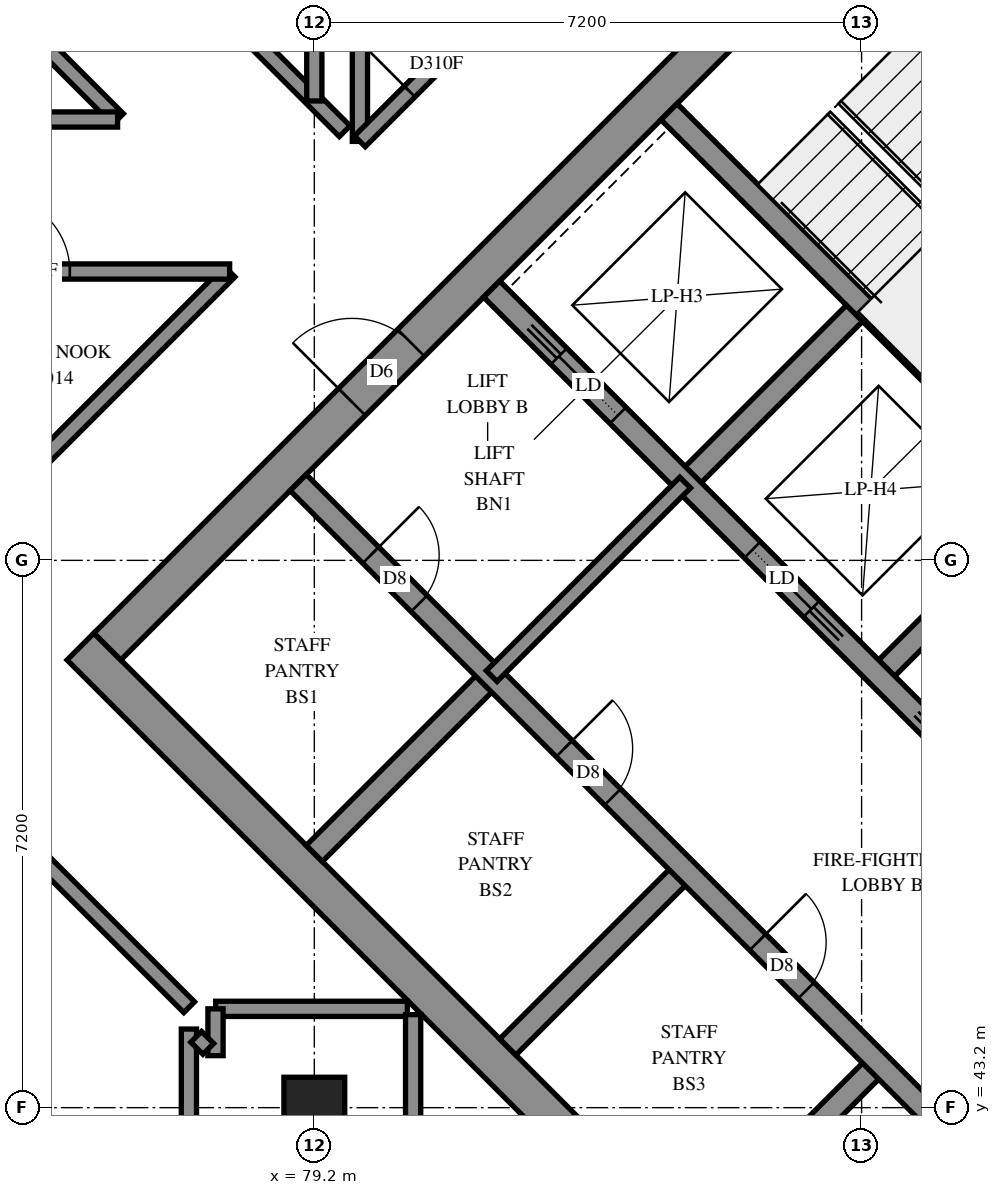
"""IFC4 building model, lengths in metres.
Left out: names, types, materials, properties, quantities, classifications, styles, units other than length and angle.
Written with IfcOpenShell. Run it as: python <this file> out.ifc"""

import sys

from ifc_helpers import new_model, si_unit, direction, frame, frame_2d, origin, origin_2d, place, context, subcontext, project, spatial, rectangle, extrude, element, fill, save


model = new_model("IFC4")
c1 = context("Model", 3, precision=1e-05, world=origin(), true_north=direction((0.0, 1.0)))
c2 = subcontext(c1, "Body", "Model", "MODEL_VIEW")
j1 = project(units=[si_unit("LENGTHUNIT", "METRE"), si_unit("PLANEANGLEUNIT", "RADIAN")], contexts=[c1])
p1 = place(None, origin())
s1 = spatial("IfcSite", under=j1, at=p1, CompositionType="ELEMENT")
p2 = place(p1, origin())
s2 = spatial("IfcBuilding", under=s1, at=p2, CompositionType="ELEMENT")
p3 = place(p2, frame((0.0, 0.0, 216.8)))
s3 = spatial("IfcBuildingStorey", under=s2, at=p3, CompositionType="ELEMENT", Elevation=216.8)
p4 = place(p3, frame((79.2, 43.2, 0.0), z_axis=(0.0, 0.0, 1.0), x_axis=(1.0, 0.0, 0.0)))
e1 = element("IfcColumn", 1, at=p4, inside=s3, PredefinedType="COLUMN", context=c2, shape_type="SweptSolid", body=[
    extrude(rectangle(XDim=0.8, YDim=0.8, at=origin_2d()), origin(), (0.0, 0.0, 1.0), 3.1),
])
p5 = place(p3, frame((76.124, 49.267, -0.3), z_axis=(0.0, 0.0, 1.0), x_axis=(0.7071067812, -0.7071067812, 0.0)))
e2 = element("IfcWall", 2, at=p5, inside=s3, PredefinedType="SHEAR", context=c2, shape_type="SweptSolid", body=[
    extrude(rectangle(XDim=15.4, YDim=0.5, at=frame_2d((7.7, 0.0))), origin(), (0.0, 0.0, 1.0), 2.7),
])
p6 = place(p3, frame((86.66, 59.802, -0.3), z_axis=(0.0, 0.0, 1.0), x_axis=(0.7071067812, -0.7071067812, 0.0)))
e3 = element("IfcWall", 3, at=p6, inside=s3, PredefinedType="SHEAR", context=c2, shape_type="SweptSolid", body=[
    extrude(rectangle(XDim=15.4, YDim=0.5, at=frame_2d((7.7, 0.0))), origin(), (0.0, 0.0, 1.0), 2.7),
])
p7 = place(p6, frame((10.5, 0.0, 0.3)))
e4 = element("IfcOpeningElement", 4, at=p7, cuts=e3, PredefinedType="OPENING", context=c2, shape_type="SweptSolid", body=[
    extrude(rectangle(XDim=0.8, YDim=2.1, at=frame_2d((0.4, 1.05))), frame((0.0, 0.26, 0.0), z_axis=(0.0, -1.0, 0.0), x_axis=(1.0, 0.0, 0.0)), (0.0, 0.0, 1.0), 0.52),
])
p8 = place(p3, frame((76.478, 49.267, -0.3), z_axis=(0.0, 0.0, 1.0), x_axis=(0.7071067812, 0.7071067812, 0.0)))
e5 = element("IfcWall", 5, at=p8, inside=s3, PredefinedType="SHEAR", context=c2, shape_type="SweptSolid", body=[
    extrude(rectangle(XDim=14.4, YDim=0.5, at=frame_2d((7.2, 0.0))), origin(), (0.0, 0.0, 1.0), 2.7),
])
p9 = place(p8, frame((4.55, 0.0, 0.3)))
e6 = element("IfcOpeningElement", 6, at=p9, cuts=e5, PredefinedType="OPENING", context=c2, shape_type="SweptSolid", body=[
    extrude(rectangle(XDim=1.1, YDim=2.1, at=frame_2d((0.55, 1.05))), frame((0.0, 0.26, 0.0), z_axis=(0.0, -1.0, 0.0), x_axis=(1.0, 0.0, 0.0)), (0.0, 0.0, 1.0), 0.52),
])
p10 = place(p8, frame((11.35, 0.0, 0.3)))
e7 = element("IfcOpeningElement", 7, at=p10, cuts=e5, PredefinedType="OPENING", context=c2, shape_type="SweptSolid", body=[
    extrude(rectangle(XDim=1.1, YDim=2.1, at=frame_2d((0.55, 1.05))), frame((0.0, 0.26, 0.0), z_axis=(0.0, -1.0, 0.0), x_axis=(1.0, 0.0, 0.0)), (0.0, 0.0, 1.0), 0.52),
])
p11 = place(p3, frame((87.013, 38.731, -0.3), z_axis=(0.0, 0.0, 1.0), x_axis=(0.7071067812, 0.7071067812, 0.0)))
e8 = element("IfcWall", 8, at=p11, inside=s3, PredefinedType="SHEAR", context=c2, shape_type="SweptSolid", body=[
    extrude(rectangle(XDim=14.4, YDim=0.5, at=frame_2d((7.2, 0.0))), origin(), (0.0, 0.0, 1.0), 2.7),
])
p12 = place(p11, frame((4.55, 0.0, 0.3)))
e9 = element("IfcOpeningElement", 9, at=p12, cuts=e8, PredefinedType="OPENING", context=c2, shape_type="SweptSolid", body=[
    extrude(rectangle(XDim=1.1, YDim=2.1, at=frame_2d((0.55, 1.05))), frame((0.0, 0.26, 0.0), z_axis=(0.0, -1.0, 0.0), x_axis=(1.0, 0.0, 0.0)), (0.0, 0.0, 1.0), 0.52),
])
p13 = place(p11, frame((11.35, 0.0, 0.3)))
e10 = element("IfcOpeningElement", 10, at=p13, cuts=e8, PredefinedType="OPENING", context=c2, shape_type="SweptSolid", body=[
    extrude(rectangle(XDim=1.1, YDim=2.1, at=frame_2d((0.55, 1.05))), frame((0.0, 0.26, 0.0), z_axis=(0.0, -1.0, 0.0), x_axis=(1.0, 0.0, 0.0)), (0.0, 0.0, 1.0), 0.52),
])
for number, where, z_axis, x_axis in (
    (11, (79.2, 46.544, 0.0), (0.0, 0.0, 1.0), (0.707, 0.707, 0.0)),
    (12, (84.079, 51.423, 0.0), (0.0, 0.0, 1.0), (0.707, 0.707, 0.0)),
):
    element("IfcWall", number, at=place(p3, frame(where, z_axis=z_axis, x_axis=x_axis)), inside=s3, PredefinedType="SOLIDWALL", context=c2, shape_type="SweptSolid", body=[
        extrude(rectangle(XDim=3.3, YDim=0.3, at=frame_2d((1.65, 0.0))), origin(), (0.0, 0.0, 1.0), 3.1),
    ])
p14 = place(p3, frame((81.746, 43.999, 0.0), z_axis=(0.0, 0.0, 1.0), x_axis=(0.7071067812, 0.7071067812, 0.0)))
e13 = element("IfcWall", 13, at=p14, inside=s3, PredefinedType="SOLIDWALL", context=c2, shape_type="SweptSolid", body=[
    extrude(rectangle(XDim=3.3, YDim=0.3, at=frame_2d((1.65, 0.0))), origin(), (0.0, 0.0, 1.0), 3.1),
])
p15 = place(p3, frame((86.625, 48.878, 0.0), z_axis=(0.0, 0.0, 1.0), x_axis=(0.7071067812, 0.7071067812, 0.0)))
e14 = element("IfcWall", 14, at=p15, inside=s3, PredefinedType="SOLIDWALL", context=c2, shape_type="SweptSolid", body=[
    extrude(rectangle(XDim=3.3, YDim=0.3, at=frame_2d((1.65, 0.0))), origin(), (0.0, 0.0, 1.0), 3.1),
])
p16 = place(p3, frame((84.291, 41.453, 0.0), z_axis=(0.0, 0.0, 1.0), x_axis=(0.7071067812, 0.7071067812, 0.0)))
e15 = element("IfcWall", 15, at=p16, inside=s3, PredefinedType="SOLIDWALL", context=c2, shape_type="SweptSolid", body=[
    extrude(rectangle(XDim=3.3, YDim=0.3, at=frame_2d((1.65, 0.0))), origin(), (0.0, 0.0, 1.0), 3.1),
])
p17 = place(p3, frame((78.988, 51.423, 0.0), z_axis=(0.0, 0.0, 1.0), x_axis=(0.7071067812, -0.7071067812, 0.0)))
e16 = element("IfcWall", 16, at=p17, inside=s3, PredefinedType="SOLIDWALL", context=c2, shape_type="SweptSolid", body=[
    extrude(rectangle(XDim=14.4, YDim=0.3, at=frame_2d((7.2, 0.0))), origin(), (0.0, 0.0, 1.0), 3.1),
])
p18 = place(p17, frame((1.35, 0.0, 0.0)))
e17 = element("IfcOpeningElement", 17, at=p18, cuts=e16, PredefinedType="OPENING", context=c2, shape_type="SweptSolid", body=[
    extrude(rectangle(XDim=0.9, YDim=2.1, at=frame_2d((0.45, 1.05))), frame((0.0, 0.16, 0.0), z_axis=(0.0, -1.0, 0.0), x_axis=(1.0, 0.0, 0.0)), (0.0, 0.0, 1.0), 0.32),
])
p19 = place(p17, frame((4.95, 0.0, 0.0)))
e18 = element("IfcOpeningElement", 18, at=p19, cuts=e16, PredefinedType="OPENING", context=c2, shape_type="SweptSolid", body=[
    extrude(rectangle(XDim=0.9, YDim=2.1, at=frame_2d((0.45, 1.05))), frame((0.0, 0.16, 0.0), z_axis=(0.0, -1.0, 0.0), x_axis=(1.0, 0.0, 0.0)), (0.0, 0.0, 1.0), 0.32),
])
p20 = place(p17, frame((8.55, 0.0, 0.0)))
e19 = element("IfcOpeningElement", 19, at=p20, cuts=e16, PredefinedType="OPENING", context=c2, shape_type="SweptSolid", body=[
    extrude(rectangle(XDim=0.9, YDim=2.1, at=frame_2d((0.45, 1.05))), frame((0.0, 0.16, 0.0), z_axis=(0.0, -1.0, 0.0), x_axis=(1.0, 0.0, 0.0)), (0.0, 0.0, 1.0), 0.32),
])
p21 = place(p17, frame((12.05, 0.0, 0.0)))
e20 = element("IfcOpeningElement", 20, at=p21, cuts=e16, PredefinedType="OPENING", context=c2, shape_type="SweptSolid", body=[
    extrude(rectangle(XDim=1.1, YDim=2.1, at=frame_2d((0.55, 1.05))), frame((0.0, 0.16, 0.0), z_axis=(0.0, -1.0, 0.0), x_axis=(1.0, 0.0, 0.0)), (0.0, 0.0, 1.0), 0.32),
])
p22 = place(p3, frame((81.534, 53.969, 0.0), z_axis=(0.0, 0.0, 1.0), x_axis=(0.707103309, -0.7071102534, 0.0)))
e21 = element("IfcWall", 21, at=p22, inside=s3, PredefinedType="SOLIDWALL", context=c2, shape_type="SweptSolid", body=[
    extrude(rectangle(XDim=14.4, YDim=0.3, at=frame_2d((7.2, 0.0))), origin(), (0.0, 0.0, 1.0), 3.1),
])
p23 = place(p22, frame((1.25, 0.0, 0.0)))
e22 = element("IfcOpeningElement", 22, at=p23, cuts=e21, PredefinedType="OPENING", context=c2, shape_type="SweptSolid", body=[
    extrude(rectangle(XDim=1.1, YDim=2.1, at=frame_2d((0.55, 1.05))), frame((0.0, 0.16, 0.0), z_axis=(0.0, -1.0, 0.0), x_axis=(1.0, 0.0, 0.0)), (0.0, 0.0, 1.0), 0.32),
])
p24 = place(p22, frame((4.85, 0.0, 0.0)))
e23 = element("IfcOpeningElement", 23, at=p24, cuts=e21, PredefinedType="OPENING", context=c2, shape_type="SweptSolid", body=[
    extrude(rectangle(XDim=1.1, YDim=2.1, at=frame_2d((0.55, 1.05))), frame((0.0, 0.16, 0.0), z_axis=(0.0, -1.0, 0.0), x_axis=(1.0, 0.0, 0.0)), (0.0, 0.0, 1.0), 0.32),
])
p25 = place(p22, frame((8.45, 0.0, 0.0)))
e24 = element("IfcOpeningElement", 24, at=p25, cuts=e21, PredefinedType="OPENING", context=c2, shape_type="SweptSolid", body=[
    extrude(rectangle(XDim=1.1, YDim=2.1, at=frame_2d((0.55, 1.05))), frame((0.0, 0.16, 0.0), z_axis=(0.0, -1.0, 0.0), x_axis=(1.0, 0.0, 0.0)), (0.0, 0.0, 1.0), 0.32),
])
p26 = place(p22, frame((12.05, 0.0, 0.0)))
e25 = element("IfcOpeningElement", 25, at=p26, cuts=e21, PredefinedType="OPENING", context=c2, shape_type="SweptSolid", body=[
    extrude(rectangle(XDim=1.1, YDim=2.1, at=frame_2d((0.55, 1.05))), frame((0.0, 0.16, 0.0), z_axis=(0.0, -1.0, 0.0), x_axis=(1.0, 0.0, 0.0)), (0.0, 0.0, 1.0), 0.32),
])
p27 = place(p3, frame((83.867, 56.302, 0.0), z_axis=(0.0, 0.0, 1.0), x_axis=(0.7071137256, -0.7070998367, 0.0)))
e26 = element("IfcWall", 26, at=p27, inside=s3, PredefinedType="SOLIDWALL", context=c2, shape_type="SweptSolid", body=[
    extrude(rectangle(XDim=7.2, YDim=0.3, at=frame_2d((3.6, 0.0))), origin(), (0.0, 0.0, 1.0), 3.1),
])
p28 = place(p3, frame((81.534, 48.878, 0.0), z_axis=(0.0, 0.0, 1.0), x_axis=(0.707092892, 0.7071206701, 0.0)))
e27 = element("IfcWall", 27, at=p28, inside=s3, PredefinedType="PARTITIONING", context=c2, shape_type="SweptSolid", body=[
    extrude(rectangle(XDim=3.6, YDim=0.2, at=frame_2d((1.8, 0.0))), origin(), (0.0, 0.0, 1.0), 3.1),
])
p29 = place(p3, frame((79.8, 55.912, 0.0), z_axis=(0.0, 0.0, 1.0), x_axis=(0.0, 1.0, 0.0)))
e28 = element("IfcWall", 28, at=p29, inside=s3, PredefinedType="PARTITIONING", context=c2, shape_type="SweptSolid", body=[
    extrude(rectangle(XDim=11.596, YDim=0.2, at=frame_2d((5.798, 0.0))), origin(), (0.0, 0.0, 1.0), 3.1),
])
p30 = place(p3, frame((79.799, 55.913, 0.0), z_axis=(0.0, 0.0, 1.0), x_axis=(0.7071067812, 0.7071067812, 0.0)))
e29 = element("IfcWall", 29, at=p30, inside=s3, PredefinedType="PARTITIONING", context=c2, shape_type="SweptSolid", body=[
    extrude(rectangle(XDim=9.95, YDim=0.2, at=frame_2d((4.975, 0.0))), origin(), (0.0, 0.0, 1.0), 3.1),
])
p31 = place(p30, frame((0.927, 0.0, 0.0)))
e30 = element("IfcOpeningElement", 30, at=p31, cuts=e29, PredefinedType="OPENING", context=c2, shape_type="SweptSolid", body=[
    extrude(rectangle(XDim=1.0, YDim=2.1, at=frame_2d((0.5, 1.05))), frame((0.0, 0.11, 0.0), z_axis=(0.0, -1.0, 0.0), x_axis=(1.0, 0.0, 0.0)), (0.0, 0.0, 1.0), 0.22),
])
p32 = place(p3, frame((86.835, 62.945, 0.0), z_axis=(0.0, 0.0, 1.0), x_axis=(0.7071067812, -0.7071067812, 0.0)))
e31 = element("IfcWall", 31, at=p32, inside=s3, PredefinedType="PARTITIONING", context=c2, shape_type="SweptSolid", body=[
    extrude(rectangle(XDim=9.798, YDim=0.2, at=frame_2d((4.899, 0.0))), origin(), (0.0, 0.0, 1.0), 3.1),
])
p33 = place(p3, frame((74.601, 50.715, 0.0), z_axis=(0.0, 0.0, 1.0), x_axis=(0.7071067812, 0.7071067812, 0.0)))
e32 = element("IfcWall", 32, at=p33, inside=s3, PredefinedType="PARTITIONING", context=c2, shape_type="SweptSolid", body=[
    extrude(rectangle(XDim=4.927, YDim=0.2, at=frame_2d((2.464, 0.0))), origin(), (0.0, 0.0, 1.0), 3.1),
])
p34 = place(p3, frame((74.272, 47.803, 0.0), z_axis=(0.0, 0.0, 1.0), x_axis=(0.7071067812, -0.7071067812, 0.0)))
e33 = element("IfcWall", 33, at=p34, inside=s3, PredefinedType="PARTITIONING", context=c2, shape_type="SweptSolid", body=[
    extrude(rectangle(XDim=4.641, YDim=0.2, at=frame_2d((2.321, 0.0))), origin(), (0.0, 0.0, 1.0), 3.1),
])
p35 = place(p34, frame((0.382, 0.0, 0.0)))
e34 = element("IfcOpeningElement", 34, at=p35, cuts=e33, PredefinedType="OPENING", context=c2, shape_type="SweptSolid", body=[
    extrude(rectangle(XDim=1.0, YDim=2.1, at=frame_2d((0.5, 1.05))), frame((0.0, 0.11, 0.0), z_axis=(0.0, -1.0, 0.0), x_axis=(1.0, 0.0, 0.0)), (0.0, 0.0, 1.0), 0.22),
])
p36 = place(p3, frame((76.513, 59.131, 0.0), z_axis=(0.0, 0.0, 1.0), x_axis=(0.7073587997, -0.7068546728, 0.0)))
e35 = element("IfcWall", 35, at=p36, inside=s3, PredefinedType="PARTITIONING", context=c2, shape_type="SweptSolid", body=[
    extrude(rectangle(XDim=4.364, YDim=0.2, at=frame_2d((2.182, 0.0))), origin(), (0.0, 0.0, 1.0), 3.1),
])
p37 = place(p3, frame((74.602, 54.2, 0.0), z_axis=(0.0, 0.0, 1.0), x_axis=(1.0, 0.0, 0.0)))
e36 = element("IfcWall", 36, at=p37, inside=s3, PredefinedType="PARTITIONING", context=c2, shape_type="SweptSolid", body=[
    extrude(rectangle(XDim=3.484, YDim=0.2, at=frame_2d((1.742, 0.0))), origin(), (0.0, 0.0, 1.0), 3.1),
])
p38 = place(p37, frame((0.382, 0.0, 0.0)))
e37 = element("IfcOpeningElement", 37, at=p38, cuts=e36, PredefinedType="OPENING", context=c2, shape_type="SweptSolid", body=[
    extrude(rectangle(XDim=1.0, YDim=2.1, at=frame_2d((0.5, 1.05))), frame((0.0, 0.11, 0.0), z_axis=(0.0, -1.0, 0.0), x_axis=(1.0, 0.0, 0.0)), (0.0, 0.0, 1.0), 0.22),
])
p39 = place(p3, frame((74.606, 58.218, 0.0), z_axis=(0.0, 0.0, 1.0), x_axis=(0.7071067812, -0.7071067812, 0.0)))
e38 = element("IfcWall", 38, at=p39, inside=s3, PredefinedType="PARTITIONING", context=c2, shape_type="SweptSolid", body=[
    extrude(rectangle(XDim=2.845, YDim=0.2, at=frame_2d((1.423, 0.0))), origin(), (0.0, 0.0, 1.0), 3.1),
])
for number, where, z_axis, x_axis in (
    (39, (77.902, 44.5, 0.0), (0.0, 0.0, 1.0), (1.0, 0.0, 0.0)),
    (40, (80.5, 41.902, 0.0), (0.0, 0.0, 1.0), (0.0, 1.0, 0.0)),
):
    element("IfcWall", number, at=place(p3, frame(where, z_axis=z_axis, x_axis=x_axis)), inside=s3, PredefinedType="PARTITIONING", context=c2, shape_type="SweptSolid", body=[
        extrude(rectangle(XDim=2.522, YDim=0.2, at=frame_2d((1.261, 0.0))), origin(), (0.0, 0.0, 1.0), 3.1),
    ])
p40 = place(p3, frame((77.55, 42.0, 0.0), z_axis=(0.0, 0.0, 1.0), x_axis=(0.0, 1.0, 0.0)))
e41 = element("IfcWall", 41, at=p40, inside=s3, PredefinedType="PARTITIONING", context=c2, shape_type="SweptSolid", body=[
    extrude(rectangle(XDim=2.234, YDim=0.2, at=frame_2d((1.117, 0.0))), origin(), (0.0, 0.0, 1.0), 3.1),
])
p41 = place(p3, frame((74.602, 56.2, 0.0), z_axis=(0.0, 0.0, 1.0), x_axis=(1.0, 0.0, 0.0)))
e42 = element("IfcWall", 42, at=p41, inside=s3, PredefinedType="PARTITIONING", context=c2, shape_type="SweptSolid", body=[
    extrude(rectangle(XDim=2.01, YDim=0.2, at=frame_2d((1.005, 0.0))), origin(), (0.0, 0.0, 1.0), 3.1),
])
p42 = place(p3, frame((79.2, 56.444, 0.0), z_axis=(0.0, 0.0, 1.0), x_axis=(0.0, 1.0, 0.0)))
e43 = element("IfcWall", 43, at=p42, inside=s3, PredefinedType="PARTITIONING", context=c2, shape_type="SweptSolid", body=[
    extrude(rectangle(XDim=0.756, YDim=0.2, at=frame_2d((0.378, 0.0))), origin(), (0.0, 0.0, 1.0), 3.1),
])
p43 = place(p3, frame((77.9, 43.884, 0.0), z_axis=(0.0, 0.0, 1.0), x_axis=(0.0, 1.0, 0.0)))
e44 = element("IfcWall", 44, at=p43, inside=s3, PredefinedType="PARTITIONING", context=c2, shape_type="SweptSolid", body=[
    extrude(rectangle(XDim=0.616, YDim=0.2, at=frame_2d((0.308, 0.0))), origin(), (0.0, 0.0, 1.0), 3.1),
])
p44 = place(p3, frame((77.646, 44.132, 0.0), z_axis=(0.0, 0.0, 1.0), x_axis=(0.7068844555, -0.707329037, 0.0)))
e45 = element("IfcWall", 45, at=p44, inside=s3, PredefinedType="PARTITIONING", context=c2, shape_type="SweptSolid", body=[
    extrude(rectangle(XDim=0.225, YDim=0.2, at=frame_2d((0.112, 0.0))), origin(), (0.0, 0.0, 1.0), 3.1),
])
p45 = place(p9, origin())
e46 = element("IfcDoor", 46, at=p45, inside=s3, OperationType="DOUBLE_DOOR_SINGLE_SWING", PredefinedType="DOOR", context=c2, shape_type="SweptSolid", body=[
    extrude(rectangle(XDim=1.1, YDim=2.1, at=frame_2d((0.55, 1.05))), frame((0.0, 0.025, 0.0), z_axis=(0.0, -1.0, 0.0), x_axis=(1.0, 0.0, 0.0)), (0.0, 0.0, 1.0), 0.05),
])
fill(e6, e46)
p46 = place(p18, origin())
e47 = element("IfcDoor", 47, at=p46, inside=s3, OperationType="SINGLE_SWING_LEFT", PredefinedType="DOOR", context=c2, shape_type="SweptSolid", body=[
    extrude(rectangle(XDim=0.9, YDim=2.1, at=frame_2d((0.45, 1.05))), frame((0.0, 0.025, 0.0), z_axis=(0.0, -1.0, 0.0), x_axis=(1.0, 0.0, 0.0)), (0.0, 0.0, 1.0), 0.05),
])
fill(e17, e47)
p47 = place(p19, origin())
e48 = element("IfcDoor", 48, at=p47, inside=s3, OperationType="SINGLE_SWING_LEFT", PredefinedType="DOOR", context=c2, shape_type="SweptSolid", body=[
    extrude(rectangle(XDim=0.9, YDim=2.1, at=frame_2d((0.45, 1.05))), frame((0.0, 0.025, 0.0), z_axis=(0.0, -1.0, 0.0), x_axis=(1.0, 0.0, 0.0)), (0.0, 0.0, 1.0), 0.05),
])
fill(e18, e48)
p48 = place(p20, origin())
e49 = element("IfcDoor", 49, at=p48, inside=s3, OperationType="SINGLE_SWING_LEFT", PredefinedType="DOOR", context=c2, shape_type="SweptSolid", body=[
    extrude(rectangle(XDim=0.9, YDim=2.1, at=frame_2d((0.45, 1.05))), frame((0.0, 0.025, 0.0), z_axis=(0.0, -1.0, 0.0), x_axis=(1.0, 0.0, 0.0)), (0.0, 0.0, 1.0), 0.05),
])
fill(e19, e49)
p49 = place(p23, origin())
e50 = element("IfcDoor", 50, at=p49, inside=s3, OperationType="SLIDING_TO_LEFT", PredefinedType="DOOR", context=c2, shape_type="SweptSolid", body=[
    extrude(rectangle(XDim=1.1, YDim=2.1, at=frame_2d((0.55, 1.05))), frame((0.0, 0.025, 0.0), z_axis=(0.0, -1.0, 0.0), x_axis=(1.0, 0.0, 0.0)), (0.0, 0.0, 1.0), 0.05),
])
fill(e22, e50)
p50 = place(p24, origin())
e51 = element("IfcDoor", 51, at=p50, inside=s3, OperationType="SLIDING_TO_RIGHT", PredefinedType="DOOR", context=c2, shape_type="SweptSolid", body=[
    extrude(rectangle(XDim=1.1, YDim=2.1, at=frame_2d((0.55, 1.05))), frame((0.0, 0.025, 0.0), z_axis=(0.0, -1.0, 0.0), x_axis=(1.0, 0.0, 0.0)), (0.0, 0.0, 1.0), 0.05),
])
fill(e23, e51)
p51 = place(p38, origin())
e52 = element("IfcDoor", 52, at=p51, inside=s3, OperationType="SINGLE_SWING_RIGHT", PredefinedType="DOOR", context=c2, shape_type="SweptSolid", body=[
    extrude(rectangle(XDim=1.0, YDim=2.1, at=frame_2d((0.5, 1.05))), frame((0.0, 0.025, 0.0), z_axis=(0.0, -1.0, 0.0), x_axis=(1.0, 0.0, 0.0)), (0.0, 0.0, 1.0), 0.05),
])
fill(e37, e52)
p52 = place(p31, origin())
e53 = element("IfcDoor", 53, at=p52, inside=s3, OperationType="SINGLE_SWING_RIGHT", PredefinedType="DOOR", context=c2, shape_type="SweptSolid", body=[
    extrude(rectangle(XDim=1.0, YDim=2.1, at=frame_2d((0.5, 1.05))), frame((0.0, 0.025, 0.0), z_axis=(0.0, -1.0, 0.0), x_axis=(1.0, 0.0, 0.0)), (0.0, 0.0, 1.0), 0.05),
])
fill(e30, e53)
save(model, sys.argv[1])
